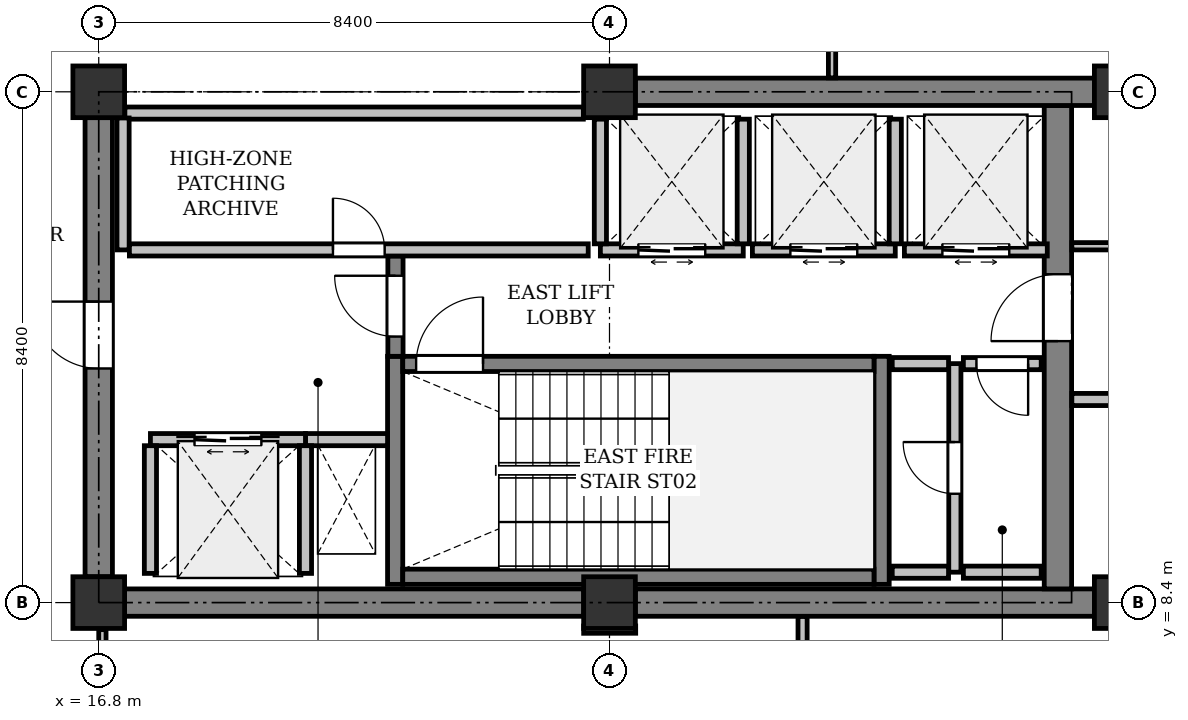
"""IFC4 building model, lengths in metres.
Left out: names, types, materials, properties, quantities, classifications, styles, units other than length and angle.
Written with IfcOpenShell. Run it as: python <this file> out.ifc"""

import sys

from ifc_helpers import new_model, si_unit, direction, frame, frame_2d, origin, origin_2d, place, context, subcontext, project, spatial, rectangle, extrude, element, fill, save


model = new_model("IFC4")
c1 = context("Model", 3, precision=1e-05, world=origin(), true_north=direction((0.0, 1.0)))
c2 = subcontext(c1, "Body", "Model", "MODEL_VIEW")
j1 = project(units=[si_unit("LENGTHUNIT", "METRE"), si_unit("PLANEANGLEUNIT", "RADIAN")], contexts=[c1])
p1 = place(None, origin())
s1 = spatial("IfcSite", under=j1, at=p1, CompositionType="ELEMENT")
p2 = place(p1, origin())
s2 = spatial("IfcBuilding", under=s1, at=p2, CompositionType="ELEMENT")
p3 = place(p2, frame((0.0, 0.0, 262.2)))
s3 = spatial("IfcBuildingStorey", under=s2, at=p3, CompositionType="ELEMENT", Elevation=262.2)
for number, where, z_axis, x_axis in (
    (1, (16.8, 8.4, 0.0), (0.0, 0.0, 1.0), (1.0, 0.0, 0.0)),
    (2, (16.8, 16.8, 0.0), (0.0, 0.0, 1.0), (1.0, 0.0, 0.0)),
    (3, (25.2, 8.4, 0.0), (0.0, 0.0, 1.0), (1.0, 0.0, 0.0)),
    (4, (25.2, 16.8, 0.0), (0.0, 0.0, 1.0), (1.0, 0.0, 0.0)),
    (5, (33.6, 8.4, 0.0), (0.0, 0.0, 1.0), (1.0, 0.0, 0.0)),
    (6, (33.6, 16.8, 0.0), (0.0, 0.0, 1.0), (1.0, 0.0, 0.0)),
):
    element("IfcColumn", number, at=place(p3, frame(where, z_axis=z_axis, x_axis=x_axis)), inside=s3, PredefinedType="COLUMN", context=c2, shape_type="SweptSolid", body=[
        extrude(rectangle(XDim=0.85, YDim=0.85, at=origin_2d()), origin(), (0.0, 0.0, 1.0), 4.0),
    ])
p4 = place(p3, frame((17.225, 8.4, 0.0), z_axis=(0.0, 0.0, 1.0), x_axis=(1.0, 0.0, 0.0)))
e7 = element("IfcWall", 7, at=p4, inside=s3, PredefinedType="SHEAR", context=c2, shape_type="SweptSolid", body=[
    extrude(rectangle(XDim=7.55, YDim=0.45, at=frame_2d((3.775, 0.0))), origin(), (0.0, 0.0, 1.0), 3.725),
])
p5 = place(p3, frame((25.625, 8.4, 0.0), z_axis=(0.0, 0.0, 1.0), x_axis=(1.0, 0.0, 0.0)))
e8 = element("IfcWall", 8, at=p5, inside=s3, PredefinedType="SHEAR", context=c2, shape_type="SweptSolid", body=[
    extrude(rectangle(XDim=7.55, YDim=0.45, at=frame_2d((3.775, 0.0))), origin(), (0.0, 0.0, 1.0), 3.725),
])
p6 = place(p3, frame((32.575, 8.625, 0.0), z_axis=(0.0, 0.0, 1.0), x_axis=(0.0, 1.0, 0.0)))
e9 = element("IfcWall", 9, at=p6, inside=s3, PredefinedType="SHEAR", context=c2, shape_type="SweptSolid", body=[
    extrude(rectangle(XDim=7.95, YDim=0.45, at=frame_2d((3.975, 0.0))), origin(), (0.0, 0.0, 1.0), 3.725),
])
p7 = place(p6, frame((4.075, 0.0, 0.0)))
e10 = element("IfcOpeningElement", 10, at=p7, cuts=e9, PredefinedType="OPENING", context=c2, shape_type="SweptSolid", body=[
    extrude(rectangle(XDim=1.1, YDim=2.15, at=frame_2d((0.55, 1.075))), frame((0.0, 0.235, 0.0), z_axis=(0.0, -1.0, 0.0), x_axis=(1.0, 0.0, 0.0)), (0.0, 0.0, 1.0), 0.47),
])
p8 = place(p3, frame((16.8, 8.825, 0.0), z_axis=(0.0, 0.0, 1.0), x_axis=(0.0, 1.0, 0.0)))
e11 = element("IfcWall", 11, at=p8, inside=s3, PredefinedType="SHEAR", context=c2, shape_type="SweptSolid", body=[
    extrude(rectangle(XDim=7.55, YDim=0.45, at=frame_2d((3.775, 0.0))), origin(), (0.0, 0.0, 1.0), 3.725),
])
p9 = place(p8, frame((3.425, 0.0, 0.0)))
e12 = element("IfcOpeningElement", 12, at=p9, cuts=e11, PredefinedType="OPENING", context=c2, shape_type="SweptSolid", body=[
    extrude(rectangle(XDim=1.1, YDim=2.15, at=frame_2d((0.55, 1.075))), frame((0.0, 0.235, 0.0), z_axis=(0.0, -1.0, 0.0), x_axis=(1.0, 0.0, 0.0)), (0.0, 0.0, 1.0), 0.47),
])
p10 = place(p3, frame((25.625, 16.8, 0.0), z_axis=(0.0, 0.0, 1.0), x_axis=(1.0, 0.0, 0.0)))
e13 = element("IfcWall", 13, at=p10, inside=s3, PredefinedType="SHEAR", context=c2, shape_type="SweptSolid", body=[
    extrude(rectangle(XDim=7.55, YDim=0.45, at=frame_2d((3.775, 0.0))), origin(), (0.0, 0.0, 1.0), 3.725),
])
for number, where, z_axis, x_axis in (
    (14, (21.675, 8.7, 0.0), (0.0, 0.0, 1.0), (0.0, 1.0, 0.0)),
    (15, (29.675, 8.7, 0.0), (0.0, 0.0, 1.0), (0.0, 1.0, 0.0)),
):
    element("IfcWall", number, at=place(p3, frame(where, z_axis=z_axis, x_axis=x_axis)), inside=s3, PredefinedType="SHEAR", context=c2, shape_type="SweptSolid", body=[
        extrude(rectangle(XDim=3.75, YDim=0.25, at=frame_2d((1.875, 0.0))), origin(), (0.0, 0.0, 1.0), 3.725),
    ])
p11 = place(p3, frame((21.8, 8.825, 0.0), z_axis=(0.0, 0.0, 1.0), x_axis=(1.0, 0.0, 0.0)))
e16 = element("IfcWall", 16, at=p11, inside=s3, PredefinedType="SHEAR", context=c2, shape_type="SweptSolid", body=[
    extrude(rectangle(XDim=7.75, YDim=0.25, at=frame_2d((3.875, 0.0))), origin(), (0.0, 0.0, 1.0), 3.725),
])
p12 = place(p3, frame((21.8, 12.325, 0.0), z_axis=(0.0, 0.0, 1.0), x_axis=(1.0, 0.0, 0.0)))
e17 = element("IfcWall", 17, at=p12, inside=s3, PredefinedType="SHEAR", context=c2, shape_type="SweptSolid", body=[
    extrude(rectangle(XDim=7.75, YDim=0.25, at=frame_2d((3.875, 0.0))), origin(), (0.0, 0.0, 1.0), 3.725),
])
p13 = place(p12, frame((0.22, 0.0, 0.0)))
e18 = element("IfcOpeningElement", 18, at=p13, cuts=e17, PredefinedType="OPENING", context=c2, shape_type="SweptSolid", body=[
    extrude(rectangle(XDim=1.1, YDim=2.15, at=frame_2d((0.55, 1.075))), frame((0.0, 0.135, 0.0), z_axis=(0.0, -1.0, 0.0), x_axis=(1.0, 0.0, 0.0)), (0.0, 0.0, 1.0), 0.27),
])
p14 = place(p3, frame((20.2, 11.08, 0.0), z_axis=(0.0, 0.0, 1.0), x_axis=(1.0, 0.0, 0.0)))
e19 = element("IfcWall", 19, at=p14, inside=s3, PredefinedType="PARTITIONING", context=c2, shape_type="SweptSolid", body=[
    extrude(rectangle(XDim=1.35, YDim=0.2, at=frame_2d((0.675, 0.0))), origin(), (0.0, 0.0, 1.0), 3.725),
])
p15 = place(p3, frame((21.68, 12.45, 0.0), z_axis=(0.0, 0.0, 1.0), x_axis=(0.0, 1.0, 0.0)))
e20 = element("IfcWall", 20, at=p15, inside=s3, PredefinedType="SHEAR", context=c2, shape_type="SweptSolid", body=[
    extrude(rectangle(XDim=1.65, YDim=0.25, at=frame_2d((0.825, 0.0))), origin(), (0.0, 0.0, 1.0), 3.725),
])
p16 = place(p15, frame((0.325, 0.0, 0.0)))
e21 = element("IfcOpeningElement", 21, at=p16, cuts=e20, PredefinedType="OPENING", context=c2, shape_type="SweptSolid", body=[
    extrude(rectangle(XDim=1.0, YDim=2.15, at=frame_2d((0.5, 1.075))), frame((0.0, 0.135, 0.0), z_axis=(0.0, -1.0, 0.0), x_axis=(1.0, 0.0, 0.0)), (0.0, 0.0, 1.0), 0.27),
])
p17 = place(p3, frame((17.65, 11.08, 0.0), z_axis=(0.0, 0.0, 1.0), x_axis=(1.0, 0.0, 0.0)))
e22 = element("IfcWall", 22, at=p17, inside=s3, PredefinedType="PARTITIONING", context=c2, shape_type="SweptSolid", body=[
    extrude(rectangle(XDim=2.55, YDim=0.2, at=frame_2d((1.275, 0.0))), origin(), (0.0, 0.0, 1.0), 3.725),
])
p18 = place(p17, frame((0.725, 0.0, 0.0)))
e23 = element("IfcOpeningElement", 23, at=p18, cuts=e22, PredefinedType="OPENING", context=c2, shape_type="SweptSolid", body=[
    extrude(rectangle(XDim=1.1, YDim=2.2, at=frame_2d((0.55, 1.1))), frame((0.0, 0.11, 0.0), z_axis=(0.0, -1.0, 0.0), x_axis=(1.0, 0.0, 0.0)), (0.0, 0.0, 1.0), 0.22),
])
for number, where, z_axis, x_axis in (
    (24, (20.2, 8.88, 0.0), (0.0, 0.0, 1.0), (0.0, 1.0, 0.0)),
    (25, (17.65, 8.88, 0.0), (0.0, 0.0, 1.0), (0.0, 1.0, 0.0)),
):
    element("IfcWall", number, at=place(p3, frame(where, z_axis=z_axis, x_axis=x_axis)), inside=s3, PredefinedType="PARTITIONING", context=c2, shape_type="SweptSolid", body=[
        extrude(rectangle(XDim=2.1, YDim=0.2, at=frame_2d((1.05, 0.0))), origin(), (0.0, 0.0, 1.0), 3.725),
    ])
p19 = place(p3, frame((25.05, 14.2, 0.0), z_axis=(0.0, 0.0, 1.0), x_axis=(1.0, 0.0, 0.0)))
e26 = element("IfcWall", 26, at=p19, inside=s3, PredefinedType="PARTITIONING", context=c2, shape_type="SweptSolid", body=[
    extrude(rectangle(XDim=2.35, YDim=0.2, at=frame_2d((1.175, 0.0))), origin(), (0.0, 0.0, 1.0), 3.725),
])
p20 = place(p19, frame((0.625, 0.0, 0.0)))
e27 = element("IfcOpeningElement", 27, at=p20, cuts=e26, PredefinedType="OPENING", context=c2, shape_type="SweptSolid", body=[
    extrude(rectangle(XDim=1.1, YDim=2.2, at=frame_2d((0.55, 1.1))), frame((0.0, 0.11, 0.0), z_axis=(0.0, -1.0, 0.0), x_axis=(1.0, 0.0, 0.0)), (0.0, 0.0, 1.0), 0.22),
])
for number, where, z_axis, x_axis in (
    (28, (27.4, 14.3, 0.0), (0.0, 0.0, 1.0), (0.0, 1.0, 0.0)),
    (29, (25.05, 14.3, 0.0), (0.0, 0.0, 1.0), (0.0, 1.0, 0.0)),
):
    element("IfcWall", number, at=place(p3, frame(where, z_axis=z_axis, x_axis=x_axis)), inside=s3, PredefinedType="PARTITIONING", context=c2, shape_type="SweptSolid", body=[
        extrude(rectangle(XDim=2.05, YDim=0.2, at=frame_2d((1.025, 0.0))), origin(), (0.0, 0.0, 1.0), 3.725),
    ])
p21 = place(p3, frame((27.55, 14.2, 0.0), z_axis=(0.0, 0.0, 1.0), x_axis=(1.0, 0.0, 0.0)))
e30 = element("IfcWall", 30, at=p21, inside=s3, PredefinedType="PARTITIONING", context=c2, shape_type="SweptSolid", body=[
    extrude(rectangle(XDim=2.35, YDim=0.2, at=frame_2d((1.175, 0.0))), origin(), (0.0, 0.0, 1.0), 3.725),
])
p22 = place(p21, frame((0.625, 0.0, 0.0)))
e31 = element("IfcOpeningElement", 31, at=p22, cuts=e30, PredefinedType="OPENING", context=c2, shape_type="SweptSolid", body=[
    extrude(rectangle(XDim=1.1, YDim=2.2, at=frame_2d((0.55, 1.1))), frame((0.0, 0.11, 0.0), z_axis=(0.0, -1.0, 0.0), x_axis=(1.0, 0.0, 0.0)), (0.0, 0.0, 1.0), 0.22),
])
p23 = place(p3, frame((29.9, 14.3, 0.0), z_axis=(0.0, 0.0, 1.0), x_axis=(0.0, 1.0, 0.0)))
e32 = element("IfcWall", 32, at=p23, inside=s3, PredefinedType="PARTITIONING", context=c2, shape_type="SweptSolid", body=[
    extrude(rectangle(XDim=2.05, YDim=0.2, at=frame_2d((1.025, 0.0))), origin(), (0.0, 0.0, 1.0), 3.725),
])
p24 = place(p3, frame((30.05, 14.2, 0.0), z_axis=(0.0, 0.0, 1.0), x_axis=(1.0, 0.0, 0.0)))
e33 = element("IfcWall", 33, at=p24, inside=s3, PredefinedType="PARTITIONING", context=c2, shape_type="SweptSolid", body=[
    extrude(rectangle(XDim=2.35, YDim=0.2, at=frame_2d((1.175, 0.0))), origin(), (0.0, 0.0, 1.0), 3.725),
])
p25 = place(p24, frame((0.625, 0.0, 0.0)))
e34 = element("IfcOpeningElement", 34, at=p25, cuts=e33, PredefinedType="OPENING", context=c2, shape_type="SweptSolid", body=[
    extrude(rectangle(XDim=1.1, YDim=2.2, at=frame_2d((0.55, 1.1))), frame((0.0, 0.11, 0.0), z_axis=(0.0, -1.0, 0.0), x_axis=(1.0, 0.0, 0.0)), (0.0, 0.0, 1.0), 0.22),
])
p26 = place(p3, frame((24.77, 16.45, 0.0), z_axis=(0.0, 0.0, 1.0), x_axis=(-1.0, 0.0, 0.0)))
e35 = element("IfcWall", 35, at=p26, inside=s3, PredefinedType="PARTITIONING", context=c2, shape_type="SweptSolid", body=[
    extrude(rectangle(XDim=7.54, YDim=0.2, at=frame_2d((3.77, 0.0))), origin(), (0.0, 0.0, 1.0), 3.725),
])
p27 = place(p3, frame((17.2, 16.37, 0.0), z_axis=(0.0, 0.0, 1.0), x_axis=(0.0, -1.0, 0.0)))
e36 = element("IfcWall", 36, at=p27, inside=s3, PredefinedType="PARTITIONING", context=c2, shape_type="SweptSolid", body=[
    extrude(rectangle(XDim=2.17, YDim=0.2, at=frame_2d((1.085, 0.0))), origin(), (0.0, 0.0, 1.0), 3.725),
])
p28 = place(p3, frame((17.304, 14.2, 0.0), z_axis=(0.0, 0.0, 1.0), x_axis=(1.0, 0.0, 0.0)))
e37 = element("IfcWall", 37, at=p28, inside=s3, PredefinedType="PARTITIONING", context=c2, shape_type="SweptSolid", body=[
    extrude(rectangle(XDim=7.546, YDim=0.2, at=frame_2d((3.773, 0.0))), origin(), (0.0, 0.0, 1.0), 3.725),
])
p29 = place(p28, frame((3.348, 0.0, 0.0)))
e38 = element("IfcOpeningElement", 38, at=p29, cuts=e37, PredefinedType="OPENING", context=c2, shape_type="SweptSolid", body=[
    extrude(rectangle(XDim=0.85, YDim=2.15, at=frame_2d((0.425, 1.075))), frame((0.0, 0.11, 0.0), z_axis=(0.0, -1.0, 0.0), x_axis=(1.0, 0.0, 0.0)), (0.0, 0.0, 1.0), 0.22),
])
p30 = place(p3, frame((30.88, 8.9, 0.0), z_axis=(0.0, 0.0, 1.0), x_axis=(0.0, 1.0, 0.0)))
e39 = element("IfcWall", 39, at=p30, inside=s3, PredefinedType="PARTITIONING", context=c2, shape_type="SweptSolid", body=[
    extrude(rectangle(XDim=3.43, YDim=0.2, at=frame_2d((1.715, 0.0))), origin(), (0.0, 0.0, 1.0), 3.725),
])
p31 = place(p30, frame((1.29, 0.0, 0.0)))
e40 = element("IfcOpeningElement", 40, at=p31, cuts=e39, PredefinedType="OPENING", context=c2, shape_type="SweptSolid", body=[
    extrude(rectangle(XDim=0.85, YDim=2.15, at=frame_2d((0.425, 1.075))), frame((0.0, 0.11, 0.0), z_axis=(0.0, -1.0, 0.0), x_axis=(1.0, 0.0, 0.0)), (0.0, 0.0, 1.0), 0.22),
])
for number, where, z_axis, x_axis in (
    (41, (30.776, 12.33, 0.0), (0.0, 0.0, 1.0), (-1.0, 0.0, 0.0)),
    (42, (29.85, 8.9, 0.0), (0.0, 0.0, 1.0), (1.0, 0.0, 0.0)),
):
    element("IfcWall", number, at=place(p3, frame(where, z_axis=z_axis, x_axis=x_axis)), inside=s3, PredefinedType="PARTITIONING", context=c2, shape_type="SweptSolid", body=[
        extrude(rectangle(XDim=0.926, YDim=0.2, at=frame_2d((0.463, 0.0))), origin(), (0.0, 0.0, 1.0), 3.725),
    ])
p32 = place(p3, frame((32.3, 12.33, 0.0), z_axis=(0.0, 0.0, 1.0), x_axis=(-1.0, 0.0, 0.0)))
e43 = element("IfcWall", 43, at=p32, inside=s3, PredefinedType="PARTITIONING", context=c2, shape_type="SweptSolid", body=[
    extrude(rectangle(XDim=1.28, YDim=0.2, at=frame_2d((0.64, 0.0))), origin(), (0.0, 0.0, 1.0), 3.725),
])
p33 = place(p32, frame((0.215, 0.0, 0.0)))
e44 = element("IfcOpeningElement", 44, at=p33, cuts=e43, PredefinedType="OPENING", context=c2, shape_type="SweptSolid", body=[
    extrude(rectangle(XDim=0.85, YDim=2.15, at=frame_2d((0.425, 1.075))), frame((0.0, 0.11, 0.0), z_axis=(0.0, -1.0, 0.0), x_axis=(1.0, 0.0, 0.0)), (0.0, 0.0, 1.0), 0.22),
])
p34 = place(p3, frame((31.02, 8.9, 0.0), z_axis=(0.0, 0.0, 1.0), x_axis=(1.0, 0.0, 0.0)))
e45 = element("IfcWall", 45, at=p34, inside=s3, PredefinedType="PARTITIONING", context=c2, shape_type="SweptSolid", body=[
    extrude(rectangle(XDim=1.28, YDim=0.2, at=frame_2d((0.64, 0.0))), origin(), (0.0, 0.0, 1.0), 3.725),
])
p35 = place(p3, frame((28.86, 19.05, 0.0), z_axis=(0.0, 0.0, 1.0), x_axis=(0.0, -1.0, 0.0)))
e46 = element("IfcWall", 46, at=p35, inside=s3, PredefinedType="PARTITIONING", context=c2, shape_type="SweptSolid", body=[
    extrude(rectangle(XDim=2.021, YDim=0.12, at=frame_2d((1.01, 0.0))), origin(), (0.0, 0.0, 1.0), 3.725),
])
p36 = place(p3, frame((32.804, 14.26, 0.0), z_axis=(0.0, 0.0, 1.0), x_axis=(1.0, 0.0, 0.0)))
e47 = element("IfcWall", 47, at=p36, inside=s3, PredefinedType="PARTITIONING", context=c2, shape_type="SweptSolid", body=[
    extrude(rectangle(XDim=1.536, YDim=0.12, at=frame_2d((0.768, 0.0))), origin(), (0.0, 0.0, 1.0), 3.319),
])
p37 = place(p3, frame((28.375, 0.124, 0.0), z_axis=(0.0, 0.0, 1.0), x_axis=(0.0, 1.0, 0.0)))
e48 = element("IfcWall", 48, at=p37, inside=s3, PredefinedType="PARTITIONING", context=c2, shape_type="SweptSolid", body=[
    extrude(rectangle(XDim=8.047, YDim=0.15, at=frame_2d((4.023, 0.0))), origin(), (0.0, 0.0, 1.0), 3.725),
])
p38 = place(p3, frame((25.631, 7.956, 0.0), z_axis=(0.0, 0.0, 1.0), x_axis=(-0.99999963391, -0.000855675671, 0.0)))
e49 = element("IfcWall", 49, at=p38, inside=s3, PredefinedType="PARTITIONING", context=c2, shape_type="SweptSolid", body=[
    extrude(rectangle(XDim=0.856, YDim=0.12, at=frame_2d((0.428, 0.0))), origin(), (0.0, 0.0, 1.0), 3.319),
])
p39 = place(p3, frame((16.86, 7.955, 0.0), z_axis=(0.0, 0.0, 1.0), x_axis=(0.0, -1.0, 0.0)))
e50 = element("IfcWall", 50, at=p39, inside=s3, PredefinedType="PARTITIONING", context=c2, shape_type="SweptSolid", body=[
    extrude(rectangle(XDim=2.555, YDim=0.12, at=frame_2d((1.278, 0.0))), origin(), (0.0, 0.0, 1.0), 3.319),
])
p40 = place(p39, frame((0.802, 0.0, 0.0)))
e51 = element("IfcOpeningElement", 51, at=p40, cuts=e50, PredefinedType="OPENING", context=c2, shape_type="SweptSolid", body=[
    extrude(rectangle(XDim=0.95, YDim=2.15, at=frame_2d((0.475, 1.075))), frame((0.0, 0.07, 0.0), z_axis=(0.0, -1.0, 0.0), x_axis=(1.0, 0.0, 0.0)), (0.0, 0.0, 1.0), 0.14),
])
p41 = place(p3, frame((34.236, 11.74, 0.0), z_axis=(0.0, 0.0, 1.0), x_axis=(-1.0, 0.0, 0.0)))
e52 = element("IfcWall", 52, at=p41, inside=s3, PredefinedType="PARTITIONING", context=c2, shape_type="SweptSolid", body=[
    extrude(rectangle(XDim=1.432, YDim=0.2, at=frame_2d((0.716, 0.0))), origin(), (0.0, 0.0, 1.0), 3.319),
])
p42 = place(p7, origin())
e53 = element("IfcDoor", 53, at=p42, inside=s3, OperationType="SINGLE_SWING_LEFT", PredefinedType="DOOR", context=c2, shape_type="SweptSolid", body=[
    extrude(rectangle(XDim=1.1, YDim=2.15, at=frame_2d((0.55, 1.075))), frame((0.0, 0.025, 0.0), z_axis=(0.0, -1.0, 0.0), x_axis=(1.0, 0.0, 0.0)), (0.0, 0.0, 1.0), 0.05),
])
fill(e10, e53)
p43 = place(p9, origin())
e54 = element("IfcDoor", 54, at=p43, inside=s3, OperationType="SINGLE_SWING_RIGHT", PredefinedType="DOOR", context=c2, shape_type="SweptSolid", body=[
    extrude(rectangle(XDim=1.1, YDim=2.15, at=frame_2d((0.55, 1.075))), frame((0.0, 0.025, 0.0), z_axis=(0.0, -1.0, 0.0), x_axis=(1.0, 0.0, 0.0)), (0.0, 0.0, 1.0), 0.05),
])
fill(e12, e54)
p44 = place(p13, origin())
e55 = element("IfcDoor", 55, at=p44, inside=s3, OperationType="SINGLE_SWING_RIGHT", PredefinedType="DOOR", context=c2, shape_type="SweptSolid", body=[
    extrude(rectangle(XDim=1.1, YDim=2.15, at=frame_2d((0.55, 1.075))), frame((0.0, 0.025, 0.0), z_axis=(0.0, -1.0, 0.0), x_axis=(1.0, 0.0, 0.0)), (0.0, 0.0, 1.0), 0.05),
])
fill(e18, e55)
p45 = place(p16, origin())
e56 = element("IfcDoor", 56, at=p45, inside=s3, OperationType="SINGLE_SWING_RIGHT", PredefinedType="DOOR", context=c2, shape_type="SweptSolid", body=[
    extrude(rectangle(XDim=1.0, YDim=2.15, at=frame_2d((0.5, 1.075))), frame((0.0, 0.025, 0.0), z_axis=(0.0, -1.0, 0.0), x_axis=(1.0, 0.0, 0.0)), (0.0, 0.0, 1.0), 0.05),
])
fill(e21, e56)
p46 = place(p18, origin())
e57 = element("IfcDoor", 57, at=p46, inside=s3, OperationType="DOUBLE_DOOR_SLIDING", PredefinedType="DOOR", context=c2, shape_type="SweptSolid", body=[
    extrude(rectangle(XDim=1.1, YDim=2.2, at=frame_2d((0.55, 1.1))), frame((0.0, 0.025, 0.0), z_axis=(0.0, -1.0, 0.0), x_axis=(1.0, 0.0, 0.0)), (0.0, 0.0, 1.0), 0.05),
])
fill(e23, e57)
p47 = place(p20, origin())
e58 = element("IfcDoor", 58, at=p47, inside=s3, OperationType="DOUBLE_DOOR_SLIDING", PredefinedType="DOOR", context=c2, shape_type="SweptSolid", body=[
    extrude(rectangle(XDim=1.1, YDim=2.2, at=frame_2d((0.55, 1.1))), frame((0.0, 0.025, 0.0), z_axis=(0.0, -1.0, 0.0), x_axis=(1.0, 0.0, 0.0)), (0.0, 0.0, 1.0), 0.05),
])
fill(e27, e58)
p48 = place(p22, origin())
e59 = element("IfcDoor", 59, at=p48, inside=s3, OperationType="DOUBLE_DOOR_SLIDING", PredefinedType="DOOR", context=c2, shape_type="SweptSolid", body=[
    extrude(rectangle(XDim=1.1, YDim=2.2, at=frame_2d((0.55, 1.1))), frame((0.0, 0.025, 0.0), z_axis=(0.0, -1.0, 0.0), x_axis=(1.0, 0.0, 0.0)), (0.0, 0.0, 1.0), 0.05),
])
fill(e31, e59)
p49 = place(p25, origin())
e60 = element("IfcDoor", 60, at=p49, inside=s3, OperationType="DOUBLE_DOOR_SLIDING", PredefinedType="DOOR", context=c2, shape_type="SweptSolid", body=[
    extrude(rectangle(XDim=1.1, YDim=2.2, at=frame_2d((0.55, 1.1))), frame((0.0, 0.025, 0.0), z_axis=(0.0, -1.0, 0.0), x_axis=(1.0, 0.0, 0.0)), (0.0, 0.0, 1.0), 0.05),
])
fill(e34, e60)
p50 = place(p29, origin())
e61 = element("IfcDoor", 61, at=p50, inside=s3, OperationType="SINGLE_SWING_LEFT", PredefinedType="DOOR", context=c2, shape_type="SweptSolid", body=[
    extrude(rectangle(XDim=0.85, YDim=2.15, at=frame_2d((0.425, 1.075))), frame((0.0, 0.025, 0.0), z_axis=(0.0, -1.0, 0.0), x_axis=(1.0, 0.0, 0.0)), (0.0, 0.0, 1.0), 0.05),
])
fill(e38, e61)
p51 = place(p31, origin())
e62 = element("IfcDoor", 62, at=p51, inside=s3, OperationType="SINGLE_SWING_RIGHT", PredefinedType="DOOR", context=c2, shape_type="SweptSolid", body=[
    extrude(rectangle(XDim=0.85, YDim=2.15, at=frame_2d((0.425, 1.075))), frame((0.0, 0.025, 0.0), z_axis=(0.0, -1.0, 0.0), x_axis=(1.0, 0.0, 0.0)), (0.0, 0.0, 1.0), 0.05),
])
fill(e40, e62)
p52 = place(p33, origin())
e63 = element("IfcDoor", 63, at=p52, inside=s3, OperationType="SINGLE_SWING_LEFT", PredefinedType="DOOR", context=c2, shape_type="SweptSolid", body=[
    extrude(rectangle(XDim=0.85, YDim=2.15, at=frame_2d((0.425, 1.075))), frame((0.0, 0.025, 0.0), z_axis=(0.0, -1.0, 0.0), x_axis=(1.0, 0.0, 0.0)), (0.0, 0.0, 1.0), 0.05),
])
fill(e44, e63)
save(model, sys.argv[1])
